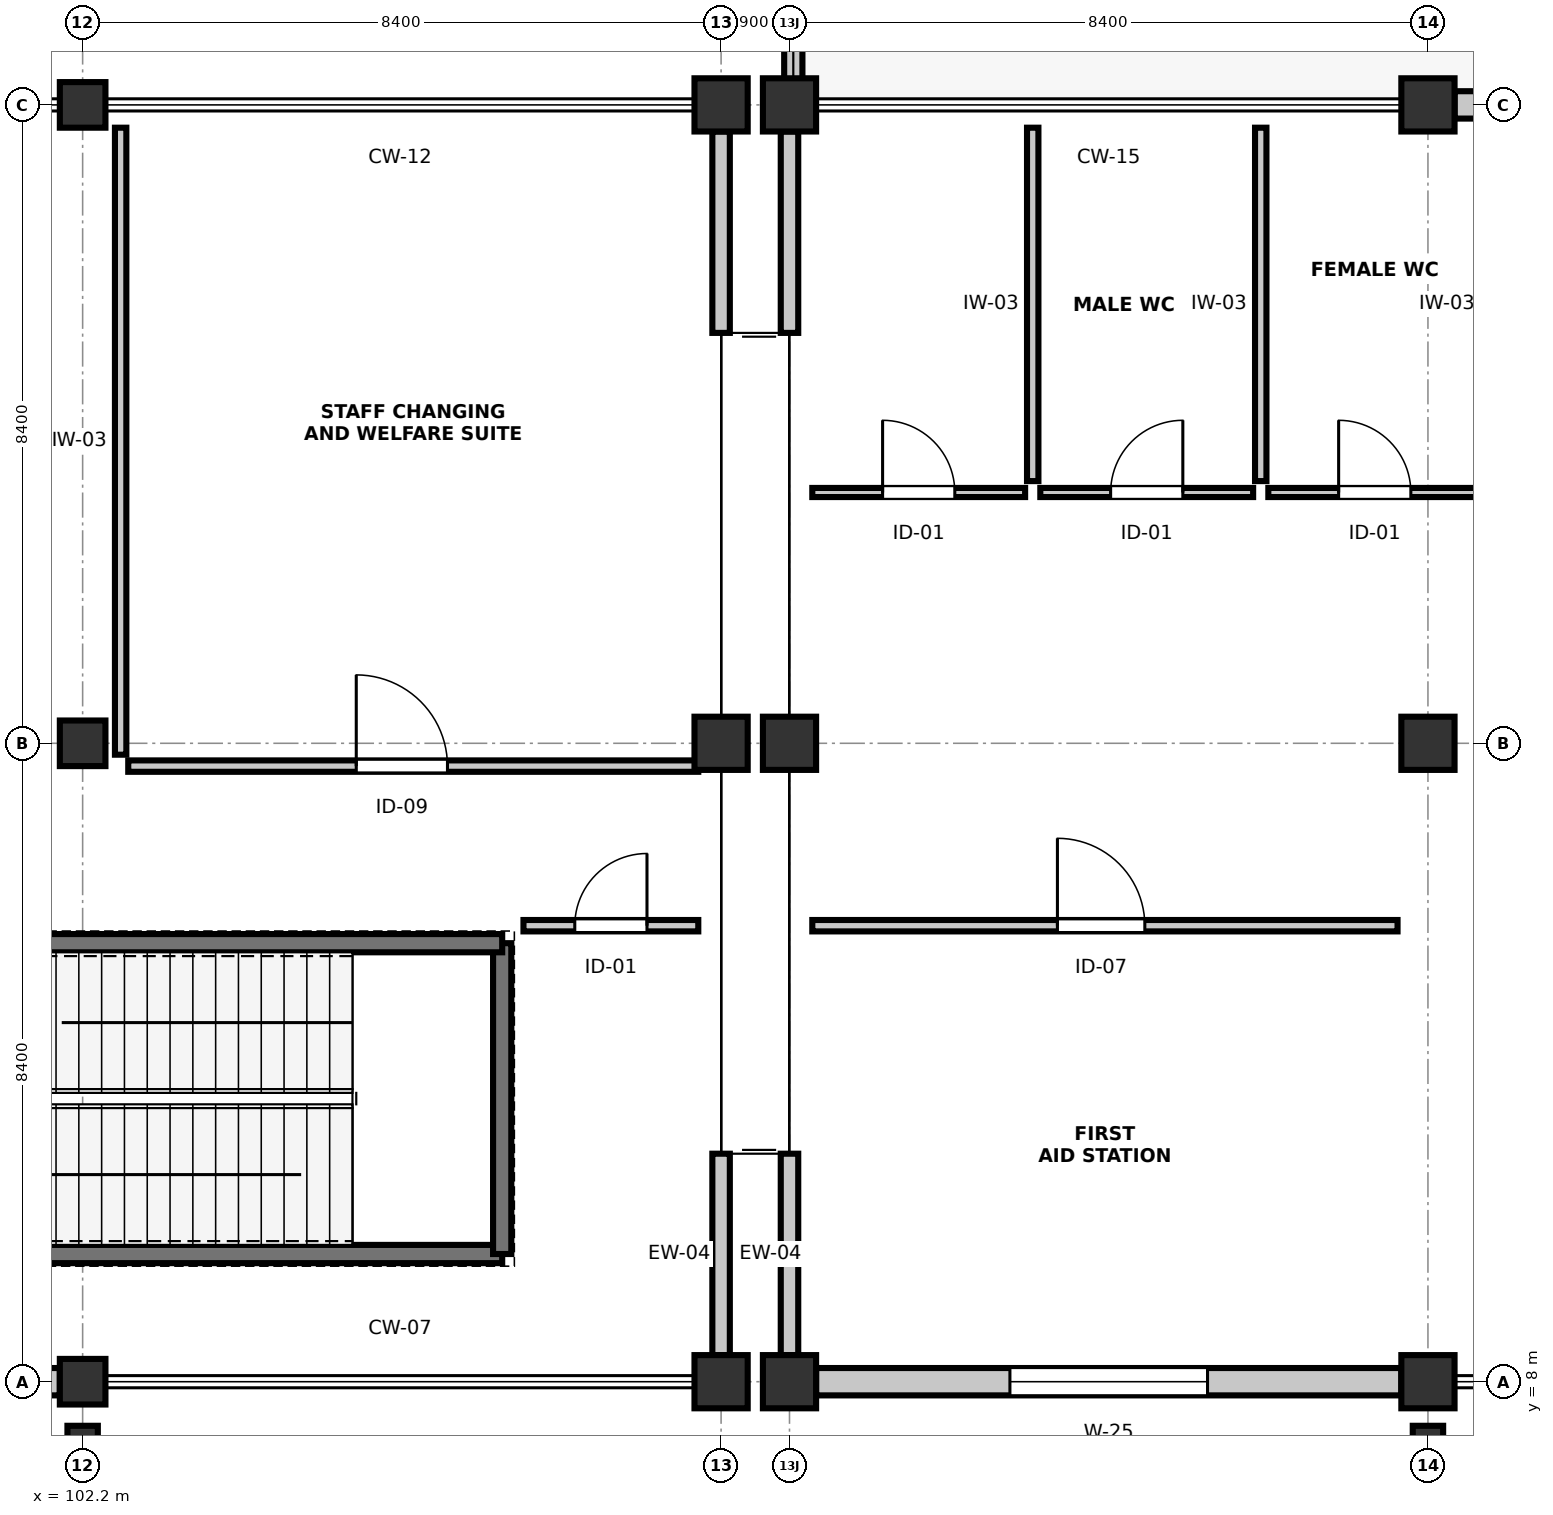
"""IFC4 building model, lengths in metres.
Left out: names, types, materials, properties, quantities, classifications, styles, units other than length and angle.
Written with IfcOpenShell. Run it as: python <this file> out.ifc"""

import sys

from ifc_helpers import new_model, si_unit, direction, frame, frame_2d, origin, origin_2d, place, context, subcontext, project, spatial, rectangle, extrude, element, fill, save


model = new_model("IFC4")
c1 = context("Model", 3, precision=1e-05, world=origin(), true_north=direction((0.0, 1.0)))
c2 = subcontext(c1, "Body", "Model", "MODEL_VIEW")
j1 = project(units=[si_unit("LENGTHUNIT", "METRE"), si_unit("PLANEANGLEUNIT", "RADIAN")], contexts=[c1])
p1 = place(None, origin())
s1 = spatial("IfcSite", under=j1, at=p1, CompositionType="ELEMENT")
p2 = place(p1, origin())
s2 = spatial("IfcBuilding", under=s1, at=p2, CompositionType="ELEMENT")
p3 = place(p2, frame((0.0, 0.0, 9.6)))
s3 = spatial("IfcBuildingStorey", under=s2, at=p3, CompositionType="ELEMENT", Elevation=9.6)
p4 = place(p3, frame((102.2, 8.0, 0.0), z_axis=(0.0, 0.0, 1.0), x_axis=(1.0, 0.0, 0.0)))
e1 = element("IfcColumn", 1, at=p4, inside=s3, PredefinedType="COLUMN", context=c2, shape_type="SweptSolid", body=[
    extrude(rectangle(XDim=0.6, YDim=0.6, at=origin_2d()), origin(), (0.0, 0.0, 1.0), 4.8),
])
p5 = place(p3, frame((102.2, 7.095, 0.0), z_axis=(0.0, 0.0, 1.0), x_axis=(1.0, 0.0, 0.0)))
e2 = element("IfcColumn", 2, at=p5, inside=s3, PredefinedType="PILASTER", context=c2, shape_type="SweptSolid", body=[
    extrude(rectangle(XDim=0.4, YDim=0.65, at=origin_2d()), origin(), (0.0, 0.0, 1.0), 4.8),
])
for number, where, z_axis, x_axis in (
    (3, (102.2, 16.4, 0.0), (0.0, 0.0, 1.0), (1.0, 0.0, 0.0)),
    (4, (102.2, 24.8, 0.0), (0.0, 0.0, 1.0), (1.0, 0.0, 0.0)),
):
    element("IfcColumn", number, at=place(p3, frame(where, z_axis=z_axis, x_axis=x_axis)), inside=s3, PredefinedType="COLUMN", context=c2, shape_type="SweptSolid", body=[
        extrude(rectangle(XDim=0.6, YDim=0.6, at=origin_2d()), origin(), (0.0, 0.0, 1.0), 4.8),
    ])
for number, where, z_axis, x_axis in (
    (5, (110.6, 8.0, 0.0), (0.0, 0.0, 1.0), (1.0, 0.0, 0.0)),
    (6, (110.6, 16.4, 0.0), (0.0, 0.0, 1.0), (1.0, 0.0, 0.0)),
    (7, (110.6, 24.8, 0.0), (0.0, 0.0, 1.0), (1.0, 0.0, 0.0)),
    (8, (111.5, 8.0, 0.0), (0.0, 0.0, 1.0), (1.0, 0.0, 0.0)),
    (9, (111.5, 16.4, 0.0), (0.0, 0.0, 1.0), (1.0, 0.0, 0.0)),
    (10, (111.5, 24.8, 0.0), (0.0, 0.0, 1.0), (1.0, 0.0, 0.0)),
    (11, (119.9, 8.0, 0.0), (0.0, 0.0, 1.0), (1.0, 0.0, 0.0)),
):
    element("IfcColumn", number, at=place(p3, frame(where, z_axis=z_axis, x_axis=x_axis)), inside=s3, PredefinedType="COLUMN", context=c2, shape_type="SweptSolid", body=[
        extrude(rectangle(XDim=0.7, YDim=0.7, at=origin_2d()), origin(), (0.0, 0.0, 1.0), 4.8),
    ])
p6 = place(p3, frame((119.9, 7.095, 0.0), z_axis=(0.0, 0.0, 1.0), x_axis=(1.0, 0.0, 0.0)))
e12 = element("IfcColumn", 12, at=p6, inside=s3, PredefinedType="PILASTER", context=c2, shape_type="SweptSolid", body=[
    extrude(rectangle(XDim=0.4, YDim=0.65, at=origin_2d()), origin(), (0.0, 0.0, 1.0), 4.8),
])
for number, where, z_axis, x_axis in (
    (13, (119.9, 16.4, 0.0), (0.0, 0.0, 1.0), (1.0, 0.0, 0.0)),
    (14, (119.9, 24.8, 0.0), (0.0, 0.0, 1.0), (1.0, 0.0, 0.0)),
):
    element("IfcColumn", number, at=place(p3, frame(where, z_axis=z_axis, x_axis=x_axis)), inside=s3, PredefinedType="COLUMN", context=c2, shape_type="SweptSolid", body=[
        extrude(rectangle(XDim=0.7, YDim=0.7, at=origin_2d()), origin(), (0.0, 0.0, 1.0), 4.8),
    ])
p7 = place(p3, frame((94.15, 8.0, 0.0), z_axis=(0.0, 0.0, 1.0), x_axis=(1.0, 0.0, 0.0)))
e15 = element("IfcWall", 15, at=p7, inside=s3, PredefinedType="STANDARD", context=c2, shape_type="SweptSolid", body=[
    extrude(rectangle(XDim=7.75, YDim=0.36, at=frame_2d((3.875, 0.0))), origin(), (0.0, 0.0, 1.0), 3.755),
])
p8 = place(p7, frame((2.825, 0.0, 0.95)))
e16 = element("IfcOpeningElement", 16, at=p8, cuts=e15, PredefinedType="OPENING", context=c2, shape_type="SweptSolid", body=[
    extrude(rectangle(XDim=2.1, YDim=1.45, at=frame_2d((1.05, 0.725))), frame((0.0, 0.19, 0.0), z_axis=(0.0, -1.0, 0.0), x_axis=(1.0, 0.0, 0.0)), (0.0, 0.0, 1.0), 0.38),
])
p9 = place(p3, frame((110.6, 8.35, 0.0), z_axis=(0.0, 0.0, 1.0), x_axis=(0.0, 1.0, 0.0)))
e17 = element("IfcWall", 17, at=p9, inside=s3, PredefinedType="STANDARD", context=c2, shape_type="SweptSolid", body=[
    extrude(rectangle(XDim=2.65, YDim=0.23, at=frame_2d((1.325, 0.0))), origin(), (0.0, 0.0, 1.0), 3.755),
])
p10 = place(p3, frame((110.6, 21.8, 0.0), z_axis=(0.0, 0.0, 1.0), x_axis=(0.0, 1.0, 0.0)))
e18 = element("IfcWall", 18, at=p10, inside=s3, PredefinedType="STANDARD", context=c2, shape_type="SweptSolid", body=[
    extrude(rectangle(XDim=2.65, YDim=0.23, at=frame_2d((1.325, 0.0))), origin(), (0.0, 0.0, 1.0), 3.715),
])
p11 = place(p3, frame((111.85, 8.0, 0.0), z_axis=(0.0, 0.0, 1.0), x_axis=(1.0, 0.0, 0.0)))
e19 = element("IfcWall", 19, at=p11, inside=s3, PredefinedType="STANDARD", context=c2, shape_type="SweptSolid", body=[
    extrude(rectangle(XDim=7.7, YDim=0.36, at=frame_2d((3.85, 0.0))), origin(), (0.0, 0.0, 1.0), 3.755),
])
p12 = place(p11, frame((2.55, 0.0, 0.95)))
e20 = element("IfcOpeningElement", 20, at=p12, cuts=e19, PredefinedType="OPENING", context=c2, shape_type="SweptSolid", body=[
    extrude(rectangle(XDim=2.6, YDim=1.45, at=frame_2d((1.3, 0.725))), frame((0.0, 0.19, 0.0), z_axis=(0.0, -1.0, 0.0), x_axis=(1.0, 0.0, 0.0)), (0.0, 0.0, 1.0), 0.38),
])
p13 = place(p3, frame((128.0, 24.8, 0.0), z_axis=(0.0, 0.0, 1.0), x_axis=(-1.0, 0.0, 0.0)))
e21 = element("IfcWall", 21, at=p13, inside=s3, PredefinedType="STANDARD", context=c2, shape_type="SweptSolid", body=[
    extrude(rectangle(XDim=7.75, YDim=0.36, at=frame_2d((3.875, 0.0))), origin(), (0.0, 0.0, 1.0), 3.555),
])
p14 = place(p13, frame((3.05, 0.0, 0.0)))
e22 = element("IfcOpeningElement", 22, at=p14, cuts=e21, PredefinedType="OPENING", context=c2, shape_type="SweptSolid", body=[
    extrude(rectangle(XDim=1.65, YDim=2.25, at=frame_2d((0.825, 1.125))), frame((0.0, 0.19, 0.0), z_axis=(0.0, -1.0, 0.0), x_axis=(1.0, 0.0, 0.0)), (0.0, 0.0, 1.0), 0.38),
])
for number, where, z_axis, x_axis in (
    (23, (111.5, 8.35, 0.0), (0.0, 0.0, 1.0), (0.0, 1.0, 0.0)),
    (24, (111.5, 21.8, 0.0), (0.0, 0.0, 1.0), (0.0, 1.0, 0.0)),
):
    element("IfcWall", number, at=place(p3, frame(where, z_axis=z_axis, x_axis=x_axis)), inside=s3, PredefinedType="STANDARD", context=c2, shape_type="SweptSolid", body=[
        extrude(rectangle(XDim=2.65, YDim=0.23, at=frame_2d((1.325, 0.0))), origin(), (0.0, 0.0, 1.0), 3.655),
    ])
p15 = place(p3, frame((111.55, 25.14, 0.0), z_axis=(0.0, 0.0, 1.0), x_axis=(0.0, 1.0, 0.0)))
e25 = element("IfcWall", 25, at=p15, inside=s3, PredefinedType="PARAPET", context=c2, shape_type="SweptSolid", body=[
    extrude(rectangle(XDim=7.508, YDim=0.24, at=frame_2d((3.754, 0.0))), origin(), (0.0, 0.0, 1.0), 0.34),
])
p16 = place(p3, frame((99.28, 9.68, 0.0), z_axis=(0.0, 0.0, 1.0), x_axis=(1.0, 0.0, 0.0)))
e26 = element("IfcWall", 26, at=p16, inside=s3, PredefinedType="SHEAR", context=c2, shape_type="SweptSolid", body=[
    extrude(rectangle(XDim=8.44, YDim=0.24, at=frame_2d((4.22, 0.0))), origin(), (0.0, 0.0, 1.0), 4.52),
])
p17 = place(p3, frame((107.72, 9.68, 0.0), z_axis=(0.0, 0.0, 1.0), x_axis=(0.0, 1.0, 0.0)))
e27 = element("IfcWall", 27, at=p17, inside=s3, PredefinedType="SHEAR", context=c2, shape_type="SweptSolid", body=[
    extrude(rectangle(XDim=4.09, YDim=0.24, at=frame_2d((2.045, 0.0))), origin(), (0.0, 0.0, 1.0), 4.52),
])
p18 = place(p3, frame((107.72, 13.77, 0.0), z_axis=(0.0, 0.0, 1.0), x_axis=(-1.0, 0.0, 0.0)))
e28 = element("IfcWall", 28, at=p18, inside=s3, PredefinedType="SHEAR", context=c2, shape_type="SweptSolid", body=[
    extrude(rectangle(XDim=8.44, YDim=0.24, at=frame_2d((4.22, 0.0))), origin(), (0.0, 0.0, 1.0), 4.52),
])
p19 = place(p3, frame((102.8, 16.1, 0.0), z_axis=(0.0, 0.0, 1.0), x_axis=(1.0, 0.0, 0.0)))
e29 = element("IfcWall", 29, at=p19, inside=s3, PredefinedType="PARTITIONING", context=c2, shape_type="SweptSolid", body=[
    extrude(rectangle(XDim=7.5, YDim=0.15, at=frame_2d((3.75, 0.0))), origin(), (0.0, 0.0, 1.0), 3.655),
])
p20 = place(p19, frame((3.0, 0.0, 0.0)))
e30 = element("IfcOpeningElement", 30, at=p20, cuts=e29, PredefinedType="OPENING", context=c2, shape_type="SweptSolid", body=[
    extrude(rectangle(XDim=1.2, YDim=2.15, at=frame_2d((0.6, 1.075))), frame((0.0, 0.085, 0.0), z_axis=(0.0, -1.0, 0.0), x_axis=(1.0, 0.0, 0.0)), (0.0, 0.0, 1.0), 0.17),
])
p21 = place(p3, frame((102.7, 16.25, 0.0), z_axis=(0.0, 0.0, 1.0), x_axis=(0.0, 1.0, 0.0)))
e31 = element("IfcWall", 31, at=p21, inside=s3, PredefinedType="PARTITIONING", context=c2, shape_type="SweptSolid", body=[
    extrude(rectangle(XDim=8.25, YDim=0.15, at=frame_2d((4.125, 0.0))), origin(), (0.0, 0.0, 1.0), 3.655),
])
p22 = place(p3, frame((111.8, 19.7, 0.0), z_axis=(0.0, 0.0, 1.0), x_axis=(1.0, 0.0, 0.0)))
e32 = element("IfcWall", 32, at=p22, inside=s3, PredefinedType="PARTITIONING", context=c2, shape_type="SweptSolid", body=[
    extrude(rectangle(XDim=2.8, YDim=0.12, at=frame_2d((1.4, 0.0))), origin(), (0.0, 0.0, 1.0), 3.655),
])
p23 = place(p22, frame((0.925, 0.0, 0.0)))
e33 = element("IfcOpeningElement", 33, at=p23, cuts=e32, PredefinedType="OPENING", context=c2, shape_type="SweptSolid", body=[
    extrude(rectangle(XDim=0.95, YDim=2.12, at=frame_2d((0.475, 1.06))), frame((0.0, 0.07, 0.0), z_axis=(0.0, -1.0, 0.0), x_axis=(1.0, 0.0, 0.0)), (0.0, 0.0, 1.0), 0.14),
])
p24 = place(p3, frame((114.8, 19.7, 0.0), z_axis=(0.0, 0.0, 1.0), x_axis=(1.0, 0.0, 0.0)))
e34 = element("IfcWall", 34, at=p24, inside=s3, PredefinedType="PARTITIONING", context=c2, shape_type="SweptSolid", body=[
    extrude(rectangle(XDim=2.8, YDim=0.12, at=frame_2d((1.4, 0.0))), origin(), (0.0, 0.0, 1.0), 4.505),
])
p25 = place(p24, frame((0.925, 0.0, 0.0)))
e35 = element("IfcOpeningElement", 35, at=p25, cuts=e34, PredefinedType="OPENING", context=c2, shape_type="SweptSolid", body=[
    extrude(rectangle(XDim=0.95, YDim=2.12, at=frame_2d((0.475, 1.06))), frame((0.0, 0.07, 0.0), z_axis=(0.0, -1.0, 0.0), x_axis=(1.0, 0.0, 0.0)), (0.0, 0.0, 1.0), 0.14),
])
p26 = place(p3, frame((114.7, 19.85, 0.0), z_axis=(0.0, 0.0, 1.0), x_axis=(0.0, 1.0, 0.0)))
e36 = element("IfcWall", 36, at=p26, inside=s3, PredefinedType="PARTITIONING", context=c2, shape_type="SweptSolid", body=[
    extrude(rectangle(XDim=4.65, YDim=0.15, at=frame_2d((2.325, 0.0))), origin(), (0.0, 0.0, 1.0), 3.555),
])
p27 = place(p3, frame((117.8, 19.7, 0.0), z_axis=(0.0, 0.0, 1.0), x_axis=(1.0, 0.0, 0.0)))
e37 = element("IfcWall", 37, at=p27, inside=s3, PredefinedType="PARTITIONING", context=c2, shape_type="SweptSolid", body=[
    extrude(rectangle(XDim=2.8, YDim=0.12, at=frame_2d((1.4, 0.0))), origin(), (0.0, 0.0, 1.0), 3.655),
])
p28 = place(p27, frame((0.925, 0.0, 0.0)))
e38 = element("IfcOpeningElement", 38, at=p28, cuts=e37, PredefinedType="OPENING", context=c2, shape_type="SweptSolid", body=[
    extrude(rectangle(XDim=0.95, YDim=2.12, at=frame_2d((0.475, 1.06))), frame((0.0, 0.07, 0.0), z_axis=(0.0, -1.0, 0.0), x_axis=(1.0, 0.0, 0.0)), (0.0, 0.0, 1.0), 0.14),
])
p29 = place(p3, frame((117.7, 19.85, 0.0), z_axis=(0.0, 0.0, 1.0), x_axis=(0.0, 1.0, 0.0)))
e39 = element("IfcWall", 39, at=p29, inside=s3, PredefinedType="PARTITIONING", context=c2, shape_type="SweptSolid", body=[
    extrude(rectangle(XDim=4.65, YDim=0.15, at=frame_2d((2.325, 0.0))), origin(), (0.0, 0.0, 1.0), 3.555),
])
p30 = place(p3, frame((111.8, 14.0, 0.0), z_axis=(0.0, 0.0, 1.0), x_axis=(1.0, 0.0, 0.0)))
e40 = element("IfcWall", 40, at=p30, inside=s3, PredefinedType="PARTITIONING", context=c2, shape_type="SweptSolid", body=[
    extrude(rectangle(XDim=7.7, YDim=0.15, at=frame_2d((3.85, 0.0))), origin(), (0.0, 0.0, 1.0), 3.655),
])
p31 = place(p30, frame((3.225, 0.0, 0.0)))
e41 = element("IfcOpeningElement", 41, at=p31, cuts=e40, PredefinedType="OPENING", context=c2, shape_type="SweptSolid", body=[
    extrude(rectangle(XDim=1.15, YDim=2.15, at=frame_2d((0.575, 1.075))), frame((0.0, 0.085, 0.0), z_axis=(0.0, -1.0, 0.0), x_axis=(1.0, 0.0, 0.0)), (0.0, 0.0, 1.0), 0.17),
])
p32 = place(p3, frame((108.0, 14.0, 0.0), z_axis=(0.0, 0.0, 1.0), x_axis=(1.0, 0.0, 0.0)))
e42 = element("IfcWall", 42, at=p32, inside=s3, PredefinedType="PARTITIONING", context=c2, shape_type="SweptSolid", body=[
    extrude(rectangle(XDim=2.3, YDim=0.15, at=frame_2d((1.15, 0.0))), origin(), (0.0, 0.0, 1.0), 4.505),
])
p33 = place(p32, frame((0.675, 0.0, 0.0)))
e43 = element("IfcOpeningElement", 43, at=p33, cuts=e42, PredefinedType="OPENING", context=c2, shape_type="SweptSolid", body=[
    extrude(rectangle(XDim=0.95, YDim=2.12, at=frame_2d((0.475, 1.06))), frame((0.0, 0.085, 0.0), z_axis=(0.0, -1.0, 0.0), x_axis=(1.0, 0.0, 0.0)), (0.0, 0.0, 1.0), 0.17),
])
p34 = place(p12, origin())
e44 = element("IfcWindow", 44, at=p34, inside=s3, PartitioningType="SINGLE_PANEL", PredefinedType="WINDOW", context=c2, shape_type="SweptSolid", body=[
    extrude(rectangle(XDim=2.6, YDim=1.45, at=frame_2d((1.3, 0.725))), frame((0.0, 0.03, 0.0), z_axis=(0.0, -1.0, 0.0), x_axis=(1.0, 0.0, 0.0)), (0.0, 0.0, 1.0), 0.06),
])
fill(e20, e44)
p35 = place(p20, origin())
e45 = element("IfcDoor", 45, at=p35, inside=s3, OperationType="SINGLE_SWING_LEFT", PredefinedType="DOOR", context=c2, shape_type="SweptSolid", body=[
    extrude(rectangle(XDim=1.2, YDim=2.15, at=frame_2d((0.6, 1.075))), frame((0.0, 0.025, 0.0), z_axis=(0.0, -1.0, 0.0), x_axis=(1.0, 0.0, 0.0)), (0.0, 0.0, 1.0), 0.05),
])
fill(e30, e45)
p36 = place(p23, origin())
e46 = element("IfcDoor", 46, at=p36, inside=s3, OperationType="SINGLE_SWING_LEFT", PredefinedType="DOOR", context=c2, shape_type="SweptSolid", body=[
    extrude(rectangle(XDim=0.95, YDim=2.12, at=frame_2d((0.475, 1.06))), frame((0.0, 0.025, 0.0), z_axis=(0.0, -1.0, 0.0), x_axis=(1.0, 0.0, 0.0)), (0.0, 0.0, 1.0), 0.05),
])
fill(e33, e46)
p37 = place(p25, origin())
e47 = element("IfcDoor", 47, at=p37, inside=s3, OperationType="SINGLE_SWING_RIGHT", PredefinedType="DOOR", context=c2, shape_type="SweptSolid", body=[
    extrude(rectangle(XDim=0.95, YDim=2.12, at=frame_2d((0.475, 1.06))), frame((0.0, 0.025, 0.0), z_axis=(0.0, -1.0, 0.0), x_axis=(1.0, 0.0, 0.0)), (0.0, 0.0, 1.0), 0.05),
])
fill(e35, e47)
p38 = place(p28, origin())
e48 = element("IfcDoor", 48, at=p38, inside=s3, OperationType="SINGLE_SWING_LEFT", PredefinedType="DOOR", context=c2, shape_type="SweptSolid", body=[
    extrude(rectangle(XDim=0.95, YDim=2.12, at=frame_2d((0.475, 1.06))), frame((0.0, 0.025, 0.0), z_axis=(0.0, -1.0, 0.0), x_axis=(1.0, 0.0, 0.0)), (0.0, 0.0, 1.0), 0.05),
])
fill(e38, e48)
p39 = place(p31, origin())
e49 = element("IfcDoor", 49, at=p39, inside=s3, OperationType="SINGLE_SWING_LEFT", PredefinedType="DOOR", context=c2, shape_type="SweptSolid", body=[
    extrude(rectangle(XDim=1.15, YDim=2.15, at=frame_2d((0.575, 1.075))), frame((0.0, 0.025, 0.0), z_axis=(0.0, -1.0, 0.0), x_axis=(1.0, 0.0, 0.0)), (0.0, 0.0, 1.0), 0.05),
])
fill(e41, e49)
p40 = place(p33, origin())
e50 = element("IfcDoor", 50, at=p40, inside=s3, OperationType="SINGLE_SWING_RIGHT", PredefinedType="DOOR", context=c2, shape_type="SweptSolid", body=[
    extrude(rectangle(XDim=0.95, YDim=2.12, at=frame_2d((0.475, 1.06))), frame((0.0, 0.025, 0.0), z_axis=(0.0, -1.0, 0.0), x_axis=(1.0, 0.0, 0.0)), (0.0, 0.0, 1.0), 0.05),
])
fill(e43, e50)
save(model, sys.argv[1])
